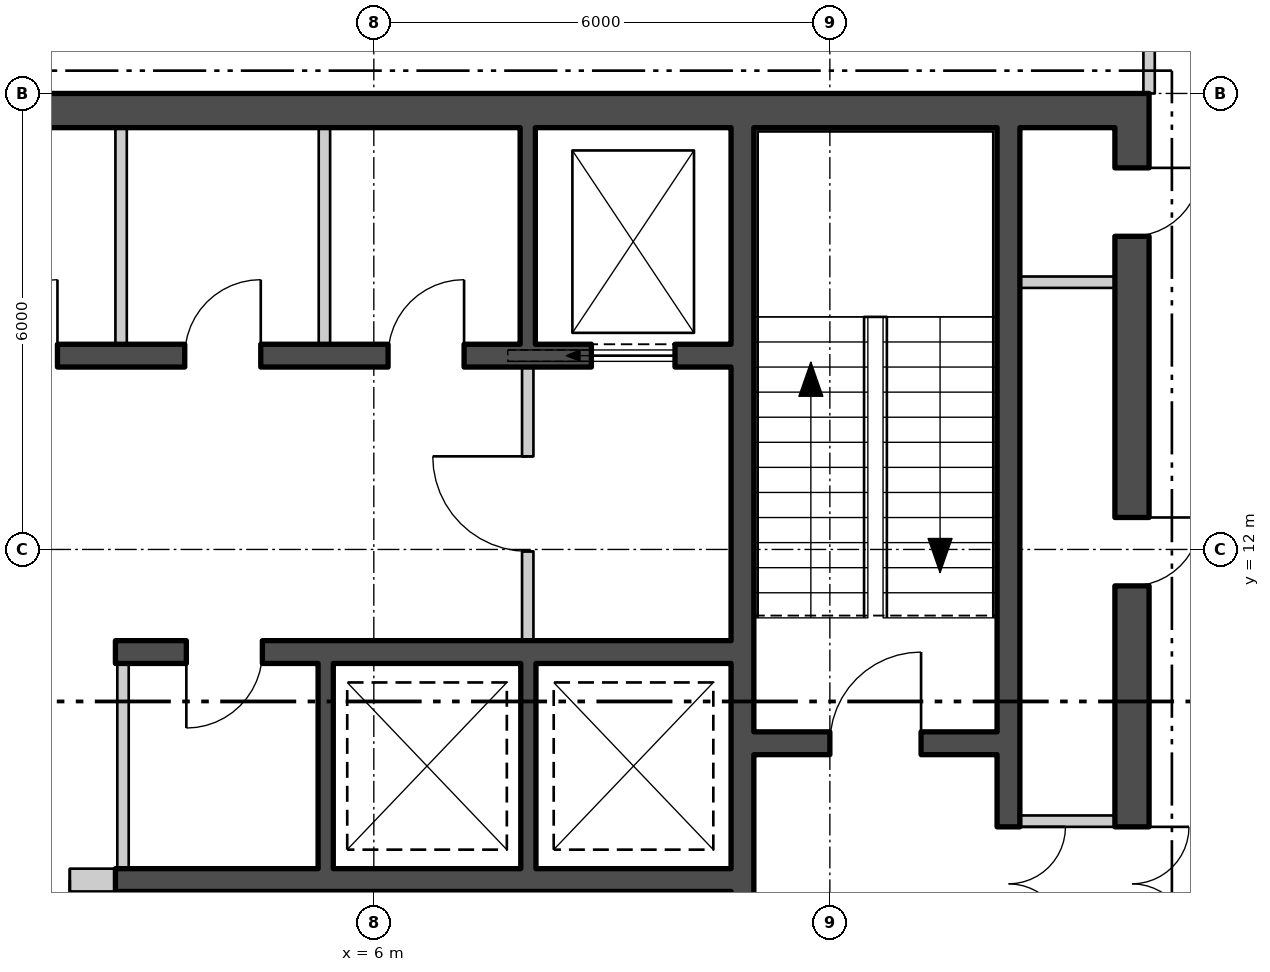
"""IFC4 building model, lengths in metres.
Left out: names, types, materials, properties, quantities, classifications, styles, units other than length and angle.
Written with IfcOpenShell. Run it as: python <this file> out.ifc"""

import sys

from ifc_helpers import new_model, si_unit, direction, frame, frame_2d, origin, place, context, subcontext, project, spatial, polyline, rectangle, outline, extrude, element, fill, save


model = new_model("IFC4")
c1 = context("Model", 3, precision=1e-05, world=origin(), true_north=direction((0.0, 1.0)))
c2 = subcontext(c1, "Body", "Model", "MODEL_VIEW")
j1 = project(units=[si_unit("LENGTHUNIT", "METRE"), si_unit("PLANEANGLEUNIT", "RADIAN")], contexts=[c1])
p1 = place(None, origin())
s1 = spatial("IfcSite", under=j1, at=p1, CompositionType="ELEMENT")
p2 = place(p1, origin())
s2 = spatial("IfcBuilding", under=s1, at=p2, CompositionType="ELEMENT")
p3 = place(p2, frame((0.0, 0.0, 227.7)))
s3 = spatial("IfcBuildingStorey", under=s2, at=p3, CompositionType="ELEMENT", Elevation=227.7)
p4 = place(p3, frame((3.21, -25.189, -0.18), z_axis=(0.0, 0.0, 1.0), x_axis=(0.499999194392, 0.866025868902, 0.0)))
e1 = element("IfcWall", 1, at=p4, inside=s3, PredefinedType="SOLIDWALL", context=c2, shape_type="SweptSolid", body=[
    extrude(outline(polyline([(-0.13, -0.225), (45.86, -0.225), (45.6, 0.225), (0.13, 0.225), (-0.13, -0.225)])), origin(), (0.0, 0.0, 1.0), 3.68),
])
p5 = place(p4, frame((1.424, 0.0, 1.08)))
e2 = element("IfcOpeningElement", 2, at=p5, cuts=e1, PredefinedType="OPENING", context=c2, shape_type="SweptSolid", body=[
    extrude(rectangle(XDim=2.4, YDim=2.0, at=frame_2d((1.2, 1.0))), frame((0.0, 0.235, 0.0), z_axis=(0.0, -1.0, 0.0), x_axis=(1.0, 0.0, 0.0)), (0.0, 0.0, 1.0), 0.47),
])
p6 = place(p4, frame((5.892, 0.0, 1.08)))
e3 = element("IfcOpeningElement", 3, at=p6, cuts=e1, PredefinedType="OPENING", context=c2, shape_type="SweptSolid", body=[
    extrude(rectangle(XDim=2.4, YDim=2.0, at=frame_2d((1.2, 1.0))), frame((0.0, 0.235, 0.0), z_axis=(0.0, -1.0, 0.0), x_axis=(1.0, 0.0, 0.0)), (0.0, 0.0, 1.0), 0.47),
])
p7 = place(p4, frame((10.399, 0.0, 1.08)))
e4 = element("IfcOpeningElement", 4, at=p7, cuts=e1, PredefinedType="OPENING", context=c2, shape_type="SweptSolid", body=[
    extrude(rectangle(XDim=2.4, YDim=2.0, at=frame_2d((1.2, 1.0))), frame((0.0, 0.235, 0.0), z_axis=(0.0, -1.0, 0.0), x_axis=(1.0, 0.0, 0.0)), (0.0, 0.0, 1.0), 0.47),
])
p8 = place(p4, frame((14.905, 0.0, 1.08)))
e5 = element("IfcOpeningElement", 5, at=p8, cuts=e1, PredefinedType="OPENING", context=c2, shape_type="SweptSolid", body=[
    extrude(rectangle(XDim=2.4, YDim=2.0, at=frame_2d((1.2, 1.0))), frame((0.0, 0.235, 0.0), z_axis=(0.0, -1.0, 0.0), x_axis=(1.0, 0.0, 0.0)), (0.0, 0.0, 1.0), 0.47),
])
p9 = place(p4, frame((19.412, 0.0, 1.08)))
e6 = element("IfcOpeningElement", 6, at=p9, cuts=e1, PredefinedType="OPENING", context=c2, shape_type="SweptSolid", body=[
    extrude(rectangle(XDim=2.4, YDim=2.0, at=frame_2d((1.2, 1.0))), frame((0.0, 0.235, 0.0), z_axis=(0.0, -1.0, 0.0), x_axis=(1.0, 0.0, 0.0)), (0.0, 0.0, 1.0), 0.47),
])
p10 = place(p4, frame((23.918, 0.0, 1.08)))
e7 = element("IfcOpeningElement", 7, at=p10, cuts=e1, PredefinedType="OPENING", context=c2, shape_type="SweptSolid", body=[
    extrude(rectangle(XDim=2.4, YDim=2.0, at=frame_2d((1.2, 1.0))), frame((0.0, 0.235, 0.0), z_axis=(0.0, -1.0, 0.0), x_axis=(1.0, 0.0, 0.0)), (0.0, 0.0, 1.0), 0.47),
])
p11 = place(p4, frame((32.932, 0.0, 1.08)))
e8 = element("IfcOpeningElement", 8, at=p11, cuts=e1, PredefinedType="OPENING", context=c2, shape_type="SweptSolid", body=[
    extrude(rectangle(XDim=2.4, YDim=2.0, at=frame_2d((1.2, 1.0))), frame((0.0, 0.235, 0.0), z_axis=(0.0, -1.0, 0.0), x_axis=(1.0, 0.0, 0.0)), (0.0, 0.0, 1.0), 0.47),
])
p12 = place(p4, frame((37.438, 0.0, 1.08)))
e9 = element("IfcOpeningElement", 9, at=p12, cuts=e1, PredefinedType="OPENING", context=c2, shape_type="SweptSolid", body=[
    extrude(rectangle(XDim=2.4, YDim=2.0, at=frame_2d((1.2, 1.0))), frame((0.0, 0.235, 0.0), z_axis=(0.0, -1.0, 0.0), x_axis=(1.0, 0.0, 0.0)), (0.0, 0.0, 1.0), 0.47),
])
p13 = place(p4, frame((41.907, 0.0, 1.08)))
e10 = element("IfcOpeningElement", 10, at=p13, cuts=e1, PredefinedType="OPENING", context=c2, shape_type="SweptSolid", body=[
    extrude(rectangle(XDim=2.4, YDim=2.0, at=frame_2d((1.2, 1.0))), frame((0.0, 0.235, 0.0), z_axis=(0.0, -1.0, 0.0), x_axis=(1.0, 0.0, 0.0)), (0.0, 0.0, 1.0), 0.47),
])
p14 = place(p3, frame((-16.2, 17.775, 0.0), z_axis=(0.0, 0.0, 1.0), x_axis=(1.0, 0.0, 0.0)))
e11 = element("IfcWall", 11, at=p14, inside=s3, PredefinedType="SHEAR", context=c2, shape_type="SweptSolid", body=[
    extrude(rectangle(XDim=32.4, YDim=0.45, at=frame_2d((16.2, 0.0))), origin(), (0.0, 0.0, 1.0), 3.7),
])
p15 = place(p3, frame((15.975, 2.45, 0.0), z_axis=(0.0, 0.0, 1.0), x_axis=(0.0, 1.0, 0.0)))
e12 = element("IfcWall", 12, at=p15, inside=s3, PredefinedType="SHEAR", context=c2, shape_type="SweptSolid", body=[
    extrude(rectangle(XDim=15.1, YDim=0.45, at=frame_2d((7.55, 0.0))), origin(), (0.0, 0.0, 1.0), 3.7),
])
p16 = place(p15, frame((4.4, 0.0, 0.0)))
e13 = element("IfcOpeningElement", 13, at=p16, cuts=e12, PredefinedType="OPENING", context=c2, shape_type="SweptSolid", body=[
    extrude(rectangle(XDim=1.5, YDim=2.1, at=frame_2d((0.75, 1.05))), frame((0.0, 0.235, 0.0), z_axis=(0.0, -1.0, 0.0), x_axis=(1.0, 0.0, 0.0)), (0.0, 0.0, 1.0), 0.47),
])
p17 = place(p15, frame((0.4, 0.0, 0.0)))
e14 = element("IfcOpeningElement", 14, at=p17, cuts=e12, PredefinedType="OPENING", context=c2, shape_type="SweptSolid", body=[
    extrude(rectangle(XDim=1.0, YDim=2.1, at=frame_2d((0.5, 1.05))), frame((0.0, 0.235, 0.0), z_axis=(0.0, -1.0, 0.0), x_axis=(1.0, 0.0, 0.0)), (0.0, 0.0, 1.0), 0.47),
])
p18 = place(p15, frame((2.5, 0.0, 0.0)))
e15 = element("IfcOpeningElement", 15, at=p18, cuts=e12, PredefinedType="OPENING", context=c2, shape_type="SweptSolid", body=[
    extrude(rectangle(XDim=0.9, YDim=2.1, at=frame_2d((0.45, 1.05))), frame((0.0, 0.235, 0.0), z_axis=(0.0, -1.0, 0.0), x_axis=(1.0, 0.0, 0.0)), (0.0, 0.0, 1.0), 0.47),
])
p19 = place(p15, frame((9.071, 0.0, 0.0)))
e16 = element("IfcOpeningElement", 16, at=p19, cuts=e12, PredefinedType="OPENING", context=c2, shape_type="SweptSolid", body=[
    extrude(rectangle(XDim=0.9, YDim=2.1, at=frame_2d((0.45, 1.05))), frame((0.0, 0.235, 0.0), z_axis=(0.0, -1.0, 0.0), x_axis=(1.0, 0.0, 0.0)), (0.0, 0.0, 1.0), 0.47),
])
p20 = place(p15, frame((13.671, 0.0, 0.0)))
e17 = element("IfcOpeningElement", 17, at=p20, cuts=e12, PredefinedType="OPENING", context=c2, shape_type="SweptSolid", body=[
    extrude(rectangle(XDim=0.9, YDim=2.1, at=frame_2d((0.45, 1.05))), frame((0.0, 0.235, 0.0), z_axis=(0.0, -1.0, 0.0), x_axis=(1.0, 0.0, 0.0)), (0.0, 0.0, 1.0), 0.47),
])
p21 = place(p3, frame((10.85, 2.45, 0.0), z_axis=(0.0, 0.0, 1.0), x_axis=(0.0, 1.0, 0.0)))
e18 = element("IfcWall", 18, at=p21, inside=s3, PredefinedType="SHEAR", context=c2, shape_type="SweptSolid", body=[
    extrude(rectangle(XDim=15.1, YDim=0.3, at=frame_2d((7.55, 0.0))), origin(), (0.0, 0.0, 1.0), 3.7),
])
p22 = place(p21, frame((3.525, 0.0, 0.0)))
e19 = element("IfcOpeningElement", 19, at=p22, cuts=e18, PredefinedType="OPENING", context=c2, shape_type="SweptSolid", body=[
    extrude(rectangle(XDim=1.25, YDim=2.1, at=frame_2d((0.625, 1.05))), frame((0.0, 0.16, 0.0), z_axis=(0.0, -1.0, 0.0), x_axis=(1.0, 0.0, 0.0)), (0.0, 0.0, 1.0), 0.32),
])
p23 = place(p21, frame((1.15, 0.0, 0.0)))
e20 = element("IfcOpeningElement", 20, at=p23, cuts=e18, PredefinedType="OPENING", context=c2, shape_type="SweptSolid", body=[
    extrude(rectangle(XDim=1.0, YDim=2.1, at=frame_2d((0.5, 1.05))), frame((0.0, 0.16, 0.0), z_axis=(0.0, -1.0, 0.0), x_axis=(1.0, 0.0, 0.0)), (0.0, 0.0, 1.0), 0.32),
])
p24 = place(p3, frame((14.35, 2.45, 0.0), z_axis=(0.0, 0.0, 1.0), x_axis=(0.0, 1.0, 0.0)))
e21 = element("IfcWall", 21, at=p24, inside=s3, PredefinedType="SHEAR", context=c2, shape_type="SweptSolid", body=[
    extrude(rectangle(XDim=15.1, YDim=0.3, at=frame_2d((7.55, 0.0))), origin(), (0.0, 0.0, 1.0), 3.7),
])
p25 = place(p24, frame((4.4, 0.0, 0.0)))
e22 = element("IfcOpeningElement", 22, at=p25, cuts=e21, PredefinedType="OPENING", context=c2, shape_type="SweptSolid", body=[
    extrude(rectangle(XDim=1.5, YDim=2.1, at=frame_2d((0.75, 1.05))), frame((0.0, 0.16, 0.0), z_axis=(0.0, -1.0, 0.0), x_axis=(1.0, 0.0, 0.0)), (0.0, 0.0, 1.0), 0.32),
])
p26 = place(p3, frame((11.0, 9.45, 0.0), z_axis=(0.0, 0.0, 1.0), x_axis=(1.0, 0.0, 0.0)))
e23 = element("IfcWall", 23, at=p26, inside=s3, PredefinedType="SHEAR", context=c2, shape_type="SweptSolid", body=[
    extrude(rectangle(XDim=3.2, YDim=0.3, at=frame_2d((1.6, 0.0))), origin(), (0.0, 0.0, 1.0), 3.7),
])
p27 = place(p26, frame((1.0, 0.0, 0.0)))
e24 = element("IfcOpeningElement", 24, at=p27, cuts=e23, PredefinedType="OPENING", context=c2, shape_type="SweptSolid", body=[
    extrude(rectangle(XDim=1.2, YDim=2.1, at=frame_2d((0.6, 1.05))), frame((0.0, 0.16, 0.0), z_axis=(0.0, -1.0, 0.0), x_axis=(1.0, 0.0, 0.0)), (0.0, 0.0, 1.0), 0.32),
])
p28 = place(p3, frame((-10.7, 14.55, 0.0), z_axis=(0.0, 0.0, 1.0), x_axis=(1.0, 0.0, 0.0)))
e25 = element("IfcWall", 25, at=p28, inside=s3, PredefinedType="SHEAR", context=c2, shape_type="SweptSolid", body=[
    extrude(rectangle(XDim=21.4, YDim=0.3, at=frame_2d((10.7, 0.0))), origin(), (0.0, 0.0, 1.0), 3.7),
])
p29 = place(p28, frame((0.738, 0.0, 0.0)))
e26 = element("IfcOpeningElement", 26, at=p29, cuts=e25, PredefinedType="OPENING", context=c2, shape_type="SweptSolid", body=[
    extrude(rectangle(XDim=1.1, YDim=2.1, at=frame_2d((0.55, 1.05))), frame((0.0, 0.16, 0.0), z_axis=(0.0, -1.0, 0.0), x_axis=(1.0, 0.0, 0.0)), (0.0, 0.0, 1.0), 0.32),
])
p30 = place(p28, frame((3.462, 0.0, 0.0)))
e27 = element("IfcOpeningElement", 27, at=p30, cuts=e25, PredefinedType="OPENING", context=c2, shape_type="SweptSolid", body=[
    extrude(rectangle(XDim=1.1, YDim=2.1, at=frame_2d((0.55, 1.05))), frame((0.0, 0.16, 0.0), z_axis=(0.0, -1.0, 0.0), x_axis=(1.0, 0.0, 0.0)), (0.0, 0.0, 1.0), 0.32),
])
p31 = place(p28, frame((6.138, 0.0, 0.0)))
e28 = element("IfcOpeningElement", 28, at=p31, cuts=e25, PredefinedType="OPENING", context=c2, shape_type="SweptSolid", body=[
    extrude(rectangle(XDim=1.1, YDim=2.1, at=frame_2d((0.55, 1.05))), frame((0.0, 0.16, 0.0), z_axis=(0.0, -1.0, 0.0), x_axis=(1.0, 0.0, 0.0)), (0.0, 0.0, 1.0), 0.32),
])
p32 = place(p28, frame((8.812, 0.0, 0.0)))
e29 = element("IfcOpeningElement", 29, at=p32, cuts=e25, PredefinedType="OPENING", context=c2, shape_type="SweptSolid", body=[
    extrude(rectangle(XDim=1.1, YDim=2.1, at=frame_2d((0.55, 1.05))), frame((0.0, 0.16, 0.0), z_axis=(0.0, -1.0, 0.0), x_axis=(1.0, 0.0, 0.0)), (0.0, 0.0, 1.0), 0.32),
])
p33 = place(p28, frame((19.562, 0.0, 0.0)))
e30 = element("IfcOpeningElement", 30, at=p33, cuts=e25, PredefinedType="OPENING", context=c2, shape_type="SweptSolid", body=[
    extrude(rectangle(XDim=1.1, YDim=2.1, at=frame_2d((0.55, 1.05))), frame((0.0, 0.16, 0.0), z_axis=(0.0, -1.0, 0.0), x_axis=(1.0, 0.0, 0.0)), (0.0, 0.0, 1.0), 0.32),
])
p34 = place(p28, frame((11.537, 0.0, 0.0)))
e31 = element("IfcOpeningElement", 31, at=p34, cuts=e25, PredefinedType="OPENING", context=c2, shape_type="SweptSolid", body=[
    extrude(rectangle(XDim=1.0, YDim=2.1, at=frame_2d((0.5, 1.05))), frame((0.0, 0.16, 0.0), z_axis=(0.0, -1.0, 0.0), x_axis=(1.0, 0.0, 0.0)), (0.0, 0.0, 1.0), 0.32),
])
p35 = place(p28, frame((14.213, 0.0, 0.0)))
e32 = element("IfcOpeningElement", 32, at=p35, cuts=e25, PredefinedType="OPENING", context=c2, shape_type="SweptSolid", body=[
    extrude(rectangle(XDim=1.0, YDim=2.1, at=frame_2d((0.5, 1.05))), frame((0.0, 0.16, 0.0), z_axis=(0.0, -1.0, 0.0), x_axis=(1.0, 0.0, 0.0)), (0.0, 0.0, 1.0), 0.32),
])
p36 = place(p28, frame((16.887, 0.0, 0.0)))
e33 = element("IfcOpeningElement", 33, at=p36, cuts=e25, PredefinedType="OPENING", context=c2, shape_type="SweptSolid", body=[
    extrude(rectangle(XDim=1.0, YDim=2.1, at=frame_2d((0.5, 1.05))), frame((0.0, 0.16, 0.0), z_axis=(0.0, -1.0, 0.0), x_axis=(1.0, 0.0, 0.0)), (0.0, 0.0, 1.0), 0.32),
])
p37 = place(p3, frame((2.6, 10.65, 0.0), z_axis=(0.0, 0.0, 1.0), x_axis=(1.0, 0.0, 0.0)))
e34 = element("IfcWall", 34, at=p37, inside=s3, PredefinedType="SHEAR", context=c2, shape_type="SweptSolid", body=[
    extrude(rectangle(XDim=8.1, YDim=0.3, at=frame_2d((4.05, 0.0))), origin(), (0.0, 0.0, 1.0), 3.7),
])
p38 = place(p37, frame((0.933, 0.0, 0.0)))
e35 = element("IfcOpeningElement", 35, at=p38, cuts=e34, PredefinedType="OPENING", context=c2, shape_type="SweptSolid", body=[
    extrude(rectangle(XDim=1.0, YDim=2.1, at=frame_2d((0.5, 1.05))), frame((0.0, 0.16, 0.0), z_axis=(0.0, -1.0, 0.0), x_axis=(1.0, 0.0, 0.0)), (0.0, 0.0, 1.0), 0.32),
])
p39 = place(p3, frame((2.6, 7.65, 0.0), z_axis=(0.0, 0.0, 1.0), x_axis=(1.0, 0.0, 0.0)))
e36 = element("IfcWall", 36, at=p39, inside=s3, PredefinedType="SHEAR", context=c2, shape_type="SweptSolid", body=[
    extrude(rectangle(XDim=8.1, YDim=0.3, at=frame_2d((4.05, 0.0))), origin(), (0.0, 0.0, 1.0), 3.7),
])
for number, where, z_axis, x_axis in (
    (37, (2.675, 14.7, 0.0), (0.0, 0.0, 1.0), (0.0, 1.0, 0.0)),
    (38, (5.35, 14.7, 0.0), (0.0, 0.0, 1.0), (0.0, 1.0, 0.0)),
):
    element("IfcWall", number, at=place(p3, frame(where, z_axis=z_axis, x_axis=x_axis)), inside=s3, PredefinedType="PARTITIONING", context=c2, shape_type="SweptSolid", body=[
        extrude(rectangle(XDim=2.85, YDim=0.15, at=frame_2d((1.425, 0.0))), origin(), (0.0, 0.0, 1.0), 3.7),
    ])
p40 = place(p3, frame((8.025, 14.7, 0.0), z_axis=(0.0, 0.0, 1.0), x_axis=(0.0, 1.0, 0.0)))
e39 = element("IfcWall", 39, at=p40, inside=s3, PredefinedType="SHEAR", context=c2, shape_type="SweptSolid", body=[
    extrude(rectangle(XDim=2.85, YDim=0.2, at=frame_2d((1.425, 0.0))), origin(), (0.0, 0.0, 1.0), 3.7),
])
p41 = place(p3, frame((2.7, 7.8, 0.0), z_axis=(0.0, 0.0, 1.0), x_axis=(0.0, 1.0, 0.0)))
e40 = element("IfcWall", 40, at=p41, inside=s3, PredefinedType="PARTITIONING", context=c2, shape_type="SweptSolid", body=[
    extrude(rectangle(XDim=2.7, YDim=0.15, at=frame_2d((1.35, 0.0))), origin(), (0.0, 0.0, 1.0), 3.7),
])
for number, where, z_axis, x_axis in (
    (41, (5.367, 7.8, 0.0), (0.0, 0.0, 1.0), (0.0, 1.0, 0.0)),
    (42, (8.033, 7.8, 0.0), (0.0, 0.0, 1.0), (0.0, 1.0, 0.0)),
):
    element("IfcWall", number, at=place(p3, frame(where, z_axis=z_axis, x_axis=x_axis)), inside=s3, PredefinedType="SHEAR", context=c2, shape_type="SweptSolid", body=[
        extrude(rectangle(XDim=2.7, YDim=0.2, at=frame_2d((1.35, 0.0))), origin(), (0.0, 0.0, 1.0), 3.7),
    ])
p42 = place(p3, frame((8.025, 10.8, 0.0), z_axis=(0.0, 0.0, 1.0), x_axis=(0.0, 1.0, 0.0)))
e43 = element("IfcWall", 43, at=p42, inside=s3, PredefinedType="PARTITIONING", context=c2, shape_type="SweptSolid", body=[
    extrude(rectangle(XDim=3.6, YDim=0.15, at=frame_2d((1.8, 0.0))), origin(), (0.0, 0.0, 1.0), 3.7),
])
p43 = place(p42, frame((1.175, 0.0, 0.0)))
e44 = element("IfcOpeningElement", 44, at=p43, cuts=e43, PredefinedType="OPENING", context=c2, shape_type="SweptSolid", body=[
    extrude(rectangle(XDim=1.25, YDim=2.1, at=frame_2d((0.625, 1.05))), frame((0.0, 0.085, 0.0), z_axis=(0.0, -1.0, 0.0), x_axis=(1.0, 0.0, 0.0)), (0.0, 0.0, 1.0), 0.17),
])
for number, where, z_axis, x_axis in (
    (45, (14.5, 8.425, 0.0), (0.0, 0.0, 1.0), (1.0, 0.0, 0.0)),
    (46, (14.5, 15.516, 0.0), (0.0, 0.0, 1.0), (1.0, 0.0, 0.0)),
):
    element("IfcWall", number, at=place(p3, frame(where, z_axis=z_axis, x_axis=x_axis)), inside=s3, PredefinedType="PARTITIONING", context=c2, shape_type="SweptSolid", body=[
        extrude(rectangle(XDim=1.25, YDim=0.15, at=frame_2d((0.625, 0.0))), origin(), (0.0, 0.0, 1.0), 3.7),
    ])
p44 = place(p3, frame((-0.4, 7.65, 0.0), z_axis=(0.0, 0.0, 1.0), x_axis=(1.0, 0.0, 0.0)))
e47 = element("IfcWall", 47, at=p44, inside=s3, PredefinedType="PARTITIONING", context=c2, shape_type="SweptSolid", body=[
    extrude(rectangle(XDim=3.0, YDim=0.3, at=frame_2d((1.5, 0.0))), origin(), (0.0, 0.0, 1.0), 3.7),
])
p45 = place(p44, frame((0.6, 0.0, 0.0)))
e48 = element("IfcOpeningElement", 48, at=p45, cuts=e47, PredefinedType="OPENING", context=c2, shape_type="SweptSolid", body=[
    extrude(rectangle(XDim=1.8, YDim=2.4, at=frame_2d((0.9, 1.2))), frame((0.0, 0.16, 0.0), z_axis=(0.0, -1.0, 0.0), x_axis=(1.0, 0.0, 0.0)), (0.0, 0.0, 1.0), 0.32),
])
p46 = place(p3, frame((16.2, 18.0, 0.0), z_axis=(0.0, 0.0, 1.0), x_axis=(0.0, 1.0, 0.0)))
e49 = element("IfcWall", 49, at=p46, inside=s3, PredefinedType="PARTITIONING", context=c2, shape_type="SweptSolid", body=[
    extrude(rectangle(XDim=1.75, YDim=0.15, at=frame_2d((0.875, 0.0))), origin(), (0.0, 0.0, 1.0), 3.7),
])
p47 = place(p33, origin())
e50 = element("IfcDoor", 50, at=p47, inside=s3, OperationType="SLIDING_TO_LEFT", PredefinedType="DOOR", context=c2, shape_type="SweptSolid", body=[
    extrude(rectangle(XDim=1.1, YDim=2.1, at=frame_2d((0.55, 1.05))), frame((0.0, 0.025, 0.0), z_axis=(0.0, -1.0, 0.0), x_axis=(1.0, 0.0, 0.0)), (0.0, 0.0, 1.0), 0.05),
])
fill(e30, e50)
p48 = place(p34, origin())
e51 = element("IfcDoor", 51, at=p48, inside=s3, OperationType="SINGLE_SWING_LEFT", PredefinedType="DOOR", context=c2, shape_type="SweptSolid", body=[
    extrude(rectangle(XDim=1.0, YDim=2.1, at=frame_2d((0.5, 1.05))), frame((0.0, 0.025, 0.0), z_axis=(0.0, -1.0, 0.0), x_axis=(1.0, 0.0, 0.0)), (0.0, 0.0, 1.0), 0.05),
])
fill(e31, e51)
p49 = place(p35, origin())
e52 = element("IfcDoor", 52, at=p49, inside=s3, OperationType="SINGLE_SWING_LEFT", PredefinedType="DOOR", context=c2, shape_type="SweptSolid", body=[
    extrude(rectangle(XDim=1.0, YDim=2.1, at=frame_2d((0.5, 1.05))), frame((0.0, 0.025, 0.0), z_axis=(0.0, -1.0, 0.0), x_axis=(1.0, 0.0, 0.0)), (0.0, 0.0, 1.0), 0.05),
])
fill(e32, e52)
p50 = place(p36, origin())
e53 = element("IfcDoor", 53, at=p50, inside=s3, OperationType="SINGLE_SWING_LEFT", PredefinedType="DOOR", context=c2, shape_type="SweptSolid", body=[
    extrude(rectangle(XDim=1.0, YDim=2.1, at=frame_2d((0.5, 1.05))), frame((0.0, 0.025, 0.0), z_axis=(0.0, -1.0, 0.0), x_axis=(1.0, 0.0, 0.0)), (0.0, 0.0, 1.0), 0.05),
])
fill(e33, e53)
p51 = place(p38, origin())
e54 = element("IfcDoor", 54, at=p51, inside=s3, OperationType="SINGLE_SWING_LEFT", PredefinedType="DOOR", context=c2, shape_type="SweptSolid", body=[
    extrude(rectangle(XDim=1.0, YDim=2.1, at=frame_2d((0.5, 1.05))), frame((0.0, 0.025, 0.0), z_axis=(0.0, -1.0, 0.0), x_axis=(1.0, 0.0, 0.0)), (0.0, 0.0, 1.0), 0.05),
])
fill(e35, e54)
p52 = place(p43, origin())
e55 = element("IfcDoor", 55, at=p52, inside=s3, OperationType="SINGLE_SWING_LEFT", PredefinedType="DOOR", context=c2, shape_type="SweptSolid", body=[
    extrude(rectangle(XDim=1.25, YDim=2.1, at=frame_2d((0.625, 1.05))), frame((0.0, 0.025, 0.0), z_axis=(0.0, -1.0, 0.0), x_axis=(1.0, 0.0, 0.0)), (0.0, 0.0, 1.0), 0.05),
])
fill(e44, e55)
p53 = place(p27, origin())
e56 = element("IfcDoor", 56, at=p53, inside=s3, OperationType="SINGLE_SWING_LEFT", PredefinedType="DOOR", context=c2, shape_type="SweptSolid", body=[
    extrude(rectangle(XDim=1.2, YDim=2.1, at=frame_2d((0.6, 1.05))), frame((0.0, 0.025, 0.0), z_axis=(0.0, -1.0, 0.0), x_axis=(1.0, 0.0, 0.0)), (0.0, 0.0, 1.0), 0.05),
])
fill(e24, e56)
p54 = place(p25, origin())
e57 = element("IfcDoor", 57, at=p54, inside=s3, OperationType="DOUBLE_DOOR_SINGLE_SWING", PredefinedType="DOOR", context=c2, shape_type="SweptSolid", body=[
    extrude(rectangle(XDim=1.5, YDim=2.1, at=frame_2d((0.75, 1.05))), frame((0.0, 0.025, 0.0), z_axis=(0.0, -1.0, 0.0), x_axis=(1.0, 0.0, 0.0)), (0.0, 0.0, 1.0), 0.05),
])
fill(e22, e57)
p55 = place(p16, origin())
e58 = element("IfcDoor", 58, at=p55, inside=s3, OperationType="DOUBLE_DOOR_SINGLE_SWING", PredefinedType="DOOR", context=c2, shape_type="SweptSolid", body=[
    extrude(rectangle(XDim=1.5, YDim=2.1, at=frame_2d((0.75, 1.05))), frame((0.0, 0.025, 0.0), z_axis=(0.0, -1.0, 0.0), x_axis=(1.0, 0.0, 0.0)), (0.0, 0.0, 1.0), 0.05),
])
fill(e13, e58)
p56 = place(p19, origin())
e59 = element("IfcDoor", 59, at=p56, inside=s3, OperationType="SINGLE_SWING_RIGHT", PredefinedType="DOOR", context=c2, shape_type="SweptSolid", body=[
    extrude(rectangle(XDim=0.9, YDim=2.1, at=frame_2d((0.45, 1.05))), frame((0.0, 0.025, 0.0), z_axis=(0.0, -1.0, 0.0), x_axis=(1.0, 0.0, 0.0)), (0.0, 0.0, 1.0), 0.05),
])
fill(e16, e59)
p57 = place(p20, origin())
e60 = element("IfcDoor", 60, at=p57, inside=s3, OperationType="SINGLE_SWING_RIGHT", PredefinedType="DOOR", context=c2, shape_type="SweptSolid", body=[
    extrude(rectangle(XDim=0.9, YDim=2.1, at=frame_2d((0.45, 1.05))), frame((0.0, 0.025, 0.0), z_axis=(0.0, -1.0, 0.0), x_axis=(1.0, 0.0, 0.0)), (0.0, 0.0, 1.0), 0.05),
])
fill(e17, e60)
p58 = place(p45, origin())
e61 = element("IfcDoor", 61, at=p58, inside=s3, OperationType="DOUBLE_DOOR_SINGLE_SWING", PredefinedType="DOOR", context=c2, shape_type="SweptSolid", body=[
    extrude(rectangle(XDim=1.8, YDim=2.4, at=frame_2d((0.9, 1.2))), frame((0.0, 0.025, 0.0), z_axis=(0.0, -1.0, 0.0), x_axis=(1.0, 0.0, 0.0)), (0.0, 0.0, 1.0), 0.05),
])
fill(e48, e61)
save(model, sys.argv[1])
